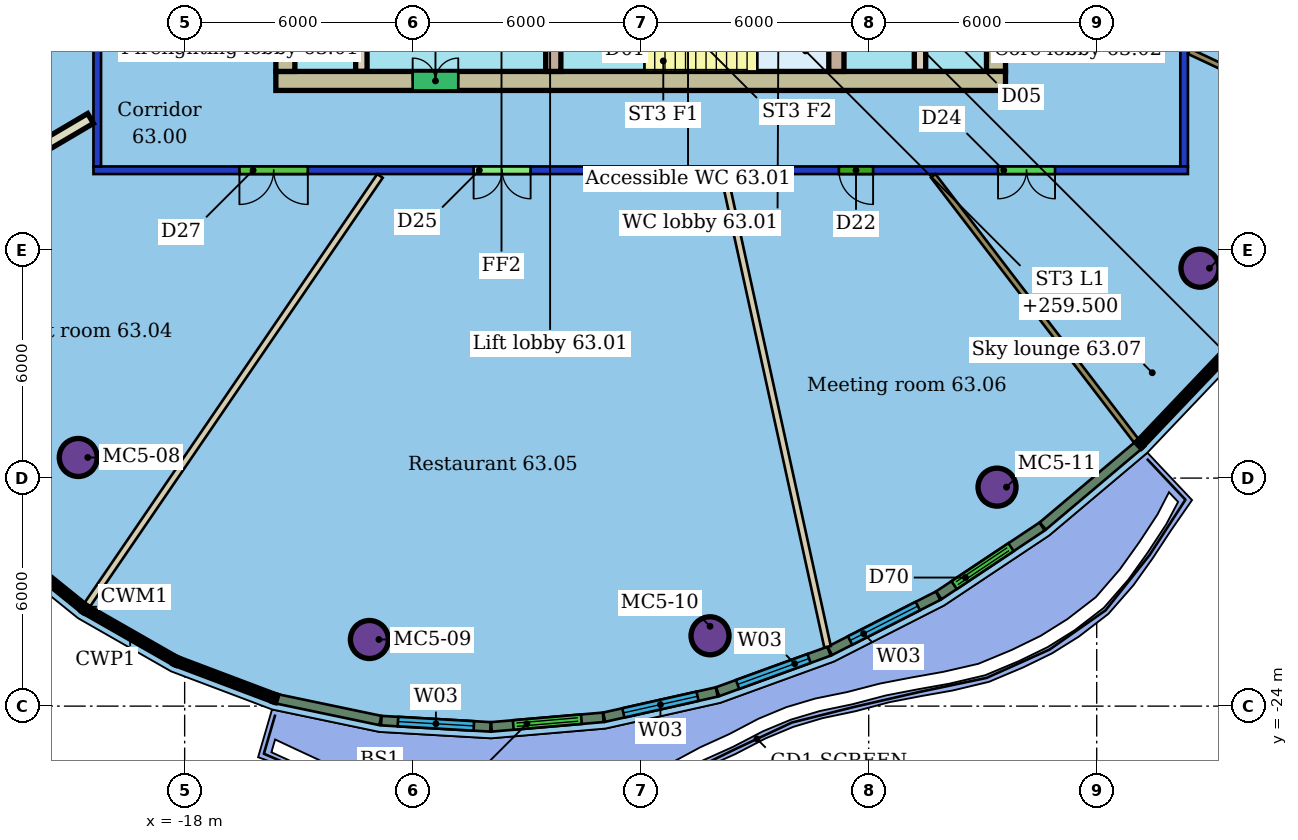
"""IFC4 building model, lengths in metres.
Left out: names, types, materials, properties, quantities, classifications, styles, units other than length and angle.
Written with IfcOpenShell. Run it as: python <this file> out.ifc"""

import sys

from ifc_helpers import new_model, si_unit, direction, frame, frame_2d, origin, origin_2d, place, context, subcontext, project, spatial, rectangle, hollow_circle, extrude, element, fill, save


model = new_model("IFC4")
c1 = context("Model", 3, precision=1e-05, world=origin(), true_north=direction((0.0, 1.0)))
c2 = subcontext(c1, "Body", "Model", "MODEL_VIEW")
j1 = project(units=[si_unit("LENGTHUNIT", "METRE"), si_unit("PLANEANGLEUNIT", "RADIAN")], contexts=[c1])
p1 = place(None, origin())
s1 = spatial("IfcSite", under=j1, at=p1, CompositionType="ELEMENT")
p2 = place(p1, origin())
s2 = spatial("IfcBuilding", under=s1, at=p2, CompositionType="ELEMENT")
p3 = place(p2, frame((0.0, 0.0, 257.7)))
s3 = spatial("IfcBuildingStorey", under=s2, at=p3, CompositionType="ELEMENT", Elevation=257.7)
for number, where, z_axis, x_axis in (
    (1, (-20.8, -17.457, 0.0), (0.0, 0.0, 1.0), (1.0, 0.0, 0.0)),
    (2, (-13.138, -22.247, 0.0), (0.0, 0.0, 1.0), (1.0, 0.0, 0.0)),
    (3, (-4.175, -22.149, 0.0), (0.0, 0.0, 1.0), (1.0, 0.0, 0.0)),
    (4, (3.377, -18.238, 0.0), (0.0, 0.0, 1.0), (1.0, 0.0, 0.0)),
    (5, (8.718, -12.477, 0.0), (0.0, 0.0, 1.0), (1.0, 0.0, 0.0)),
):
    element("IfcColumn", number, at=place(p3, frame(where, z_axis=z_axis, x_axis=x_axis)), inside=s3, PredefinedType="COLUMN", context=c2, shape_type="SweptSolid", body=[
        extrude(hollow_circle(Radius=0.5, WallThickness=0.04, at=origin_2d()), origin(), (0.0, 0.0, 1.0), 3.45),
    ])
p4 = place(p3, frame((8.4, -9.9, 0.0), z_axis=(0.0, 0.0, 1.0), x_axis=(-1.0, 0.0, 0.0)))
e6 = element("IfcWall", 6, at=p4, inside=s3, PredefinedType="PARTITIONING", context=c2, shape_type="SweptSolid", body=[
    extrude(rectangle(XDim=28.8, YDim=0.2, at=frame_2d((14.4, 0.0))), origin(), (0.0, 0.0, 1.0), 3.1),
])
p5 = place(p4, frame((23.159, 0.0, 0.0)))
e7 = element("IfcOpeningElement", 7, at=p5, cuts=e6, PredefinedType="OPENING", context=c2, shape_type="SweptSolid", body=[
    extrude(rectangle(XDim=1.8, YDim=2.4, at=frame_2d((0.9, 1.2))), frame((0.0, 0.11, 0.0), z_axis=(0.0, -1.0, 0.0), x_axis=(1.0, 0.0, 0.0)), (0.0, 0.0, 1.0), 0.22),
])
p6 = place(p4, frame((17.296, 0.0, 0.0)))
e8 = element("IfcOpeningElement", 8, at=p6, cuts=e6, PredefinedType="OPENING", context=c2, shape_type="SweptSolid", body=[
    extrude(rectangle(XDim=1.5, YDim=2.4, at=frame_2d((0.75, 1.2))), frame((0.0, 0.11, 0.0), z_axis=(0.0, -1.0, 0.0), x_axis=(1.0, 0.0, 0.0)), (0.0, 0.0, 1.0), 0.22),
])
p7 = place(p4, frame((8.284, 0.0, 0.0)))
e9 = element("IfcOpeningElement", 9, at=p7, cuts=e6, PredefinedType="OPENING", context=c2, shape_type="SweptSolid", body=[
    extrude(rectangle(XDim=0.9, YDim=2.1, at=frame_2d((0.45, 1.05))), frame((0.0, 0.11, 0.0), z_axis=(0.0, -1.0, 0.0), x_axis=(1.0, 0.0, 0.0)), (0.0, 0.0, 1.0), 0.22),
])
p8 = place(p4, frame((3.497, 0.0, 0.0)))
e10 = element("IfcOpeningElement", 10, at=p8, cuts=e6, PredefinedType="OPENING", context=c2, shape_type="SweptSolid", body=[
    extrude(rectangle(XDim=1.5, YDim=2.1, at=frame_2d((0.75, 1.05))), frame((0.0, 0.11, 0.0), z_axis=(0.0, -1.0, 0.0), x_axis=(1.0, 0.0, 0.0)), (0.0, 0.0, 1.0), 0.22),
])
p9 = place(p3, frame((-20.3, -9.8, 0.0), z_axis=(0.0, 0.0, 1.0), x_axis=(0.0, 1.0, 0.0)))
e11 = element("IfcWall", 11, at=p9, inside=s3, PredefinedType="PARTITIONING", context=c2, shape_type="SweptSolid", body=[
    extrude(rectangle(XDim=19.6, YDim=0.2, at=frame_2d((9.8, 0.0))), origin(), (0.0, 0.0, 1.0), 3.1),
])
p10 = place(p9, frame((13.85, 0.0, 0.0)))
e12 = element("IfcOpeningElement", 12, at=p10, cuts=e11, PredefinedType="OPENING", context=c2, shape_type="SweptSolid", body=[
    extrude(rectangle(XDim=1.5, YDim=2.1, at=frame_2d((0.75, 1.05))), frame((0.0, 0.11, 0.0), z_axis=(0.0, -1.0, 0.0), x_axis=(1.0, 0.0, 0.0)), (0.0, 0.0, 1.0), 0.22),
])
p11 = place(p9, frame((7.092, 0.0, 0.0)))
e13 = element("IfcOpeningElement", 13, at=p11, cuts=e11, PredefinedType="OPENING", context=c2, shape_type="SweptSolid", body=[
    extrude(rectangle(XDim=1.8, YDim=2.4, at=frame_2d((0.9, 1.2))), frame((0.0, 0.11, 0.0), z_axis=(0.0, -1.0, 0.0), x_axis=(1.0, 0.0, 0.0)), (0.0, 0.0, 1.0), 0.22),
])
p12 = place(p3, frame((8.3, 9.8, 0.0), z_axis=(0.0, 0.0, 1.0), x_axis=(0.0, -1.0, 0.0)))
e14 = element("IfcWall", 14, at=p12, inside=s3, PredefinedType="PARTITIONING", context=c2, shape_type="SweptSolid", body=[
    extrude(rectangle(XDim=19.6, YDim=0.2, at=frame_2d((9.8, 0.0))), origin(), (0.0, 0.0, 1.0), 3.1),
])
p13 = place(p12, frame((10.094, 0.0, 0.0)))
e15 = element("IfcOpeningElement", 15, at=p13, cuts=e14, PredefinedType="OPENING", context=c2, shape_type="SweptSolid", body=[
    extrude(rectangle(XDim=1.8, YDim=2.1, at=frame_2d((0.9, 1.05))), frame((0.0, 0.11, 0.0), z_axis=(0.0, -1.0, 0.0), x_axis=(1.0, 0.0, 0.0)), (0.0, 0.0, 1.0), 0.22),
])
p14 = place(p3, frame((-27.309, -12.566, 0.0), z_axis=(0.0, 0.0, 1.0), x_axis=(0.861365558052, 0.507985605506, 0.0)))
e16 = element("IfcWall", 16, at=p14, inside=s3, PredefinedType="PARTITIONING", context=c2, shape_type="SweptSolid", body=[
    extrude(rectangle(XDim=7.932, YDim=0.3, at=frame_2d((3.966, 0.0))), origin(), (0.0, 0.0, 1.0), 3.45),
])
p15 = place(p3, frame((-20.565, -21.335, 0.0), z_axis=(0.0, 0.0, 1.0), x_axis=(0.563811273549, 0.825903655289, 0.0)))
e17 = element("IfcWall", 17, at=p15, inside=s3, PredefinedType="PARTITIONING", context=c2, shape_type="SweptSolid", body=[
    extrude(rectangle(XDim=13.665, YDim=0.175, at=frame_2d((6.833, 0.0))), origin(), (0.0, 0.0, 1.0), 3.45),
])
p16 = place(p3, frame((-1.083, -22.437, 0.0), z_axis=(0.0, 0.0, 1.0), x_axis=(-0.214054252259, 0.976821773452, 0.0)))
e18 = element("IfcWall", 18, at=p16, inside=s3, PredefinedType="PARTITIONING", context=c2, shape_type="SweptSolid", body=[
    extrude(rectangle(XDim=12.713, YDim=0.175, at=frame_2d((6.356, 0.0))), origin(), (0.0, 0.0, 1.0), 3.45),
])
p17 = place(p3, frame((7.042, -17.022, 0.0), z_axis=(0.0, 0.0, 1.0), x_axis=(-0.60820873777, 0.793777129489, 0.0)))
e19 = element("IfcWall", 19, at=p17, inside=s3, PredefinedType="PARTITIONING", context=c2, shape_type="SweptSolid", body=[
    extrude(rectangle(XDim=8.789, YDim=0.15, at=frame_2d((4.394, 0.0))), origin(), (0.0, 0.0, 1.0), 3.45),
])
p18 = place(p3, frame((13.177, -8.997, 0.0), z_axis=(0.0, 0.0, 1.0), x_axis=(-0.90531006568, 0.424751321337, 0.0)))
e20 = element("IfcWall", 20, at=p18, inside=s3, PredefinedType="PARTITIONING", context=c2, shape_type="SweptSolid", body=[
    extrude(rectangle(XDim=5.241, YDim=0.15, at=frame_2d((2.621, 0.0))), origin(), (0.0, 0.0, 1.0), 3.45),
])
p19 = place(p3, frame((-15.563, -23.811, 0.0), z_axis=(0.0, 0.0, 1.0), x_axis=(0.978796787282, -0.20483371111, 0.0)))
e21 = element("IfcWall", 21, at=p19, inside=s3, PredefinedType="SOLIDWALL", context=c2, shape_type="SweptSolid", body=[
    extrude(rectangle(XDim=2.771, YDim=0.25, at=frame_2d((1.386, 0.0))), origin(), (0.0, 0.0, 1.0), 3.15),
])
p20 = place(p3, frame((-12.824, -24.382, 0.0), z_axis=(0.0, 0.0, 1.0), x_axis=(0.998361927318, -0.057214177282, 0.0)))
e22 = element("IfcWall", 22, at=p20, inside=s3, PredefinedType="SOLIDWALL", context=c2, shape_type="SweptSolid", body=[
    extrude(rectangle(XDim=2.876, YDim=0.25, at=frame_2d((1.438, 0.0))), origin(), (0.0, 0.0, 1.0), 3.15),
])
p21 = place(p20, frame((0.438, 0.0, 0.9)))
e23 = element("IfcOpeningElement", 23, at=p21, cuts=e22, PredefinedType="OPENING", context=c2, shape_type="SweptSolid", body=[
    extrude(rectangle(XDim=2.0, YDim=2.1, at=frame_2d((1.0, 1.05))), frame((0.0, 0.135, 0.0), z_axis=(0.0, -1.0, 0.0), x_axis=(1.0, 0.0, 0.0)), (0.0, 0.0, 1.0), 0.27),
])
p22 = place(p3, frame((-9.927, -24.546, 0.0), z_axis=(0.0, 0.0, 1.0), x_axis=(0.996387742916, 0.084920349541, 0.0)))
e24 = element("IfcWall", 24, at=p22, inside=s3, PredefinedType="SOLIDWALL", context=c2, shape_type="SweptSolid", body=[
    extrude(rectangle(XDim=2.953, YDim=0.25, at=frame_2d((1.476, 0.0))), origin(), (0.0, 0.0, 1.0), 3.15),
])
p23 = place(p22, frame((0.576, 0.0, 0.0)))
e25 = element("IfcOpeningElement", 25, at=p23, cuts=e24, PredefinedType="OPENING", context=c2, shape_type="SweptSolid", body=[
    extrude(rectangle(XDim=1.8, YDim=2.4, at=frame_2d((0.9, 1.2))), frame((0.0, 0.135, 0.0), z_axis=(0.0, -1.0, 0.0), x_axis=(1.0, 0.0, 0.0)), (0.0, 0.0, 1.0), 0.27),
])
p24 = place(p3, frame((-6.961, -24.291, 0.0), z_axis=(0.0, 0.0, 1.0), x_axis=(0.975828037389, 0.218539793734, 0.0)))
e26 = element("IfcWall", 26, at=p24, inside=s3, PredefinedType="SOLIDWALL", context=c2, shape_type="SweptSolid", body=[
    extrude(rectangle(XDim=3.035, YDim=0.25, at=frame_2d((1.518, 0.0))), origin(), (0.0, 0.0, 1.0), 3.15),
])
p25 = place(p24, frame((0.518, 0.0, 0.9)))
e27 = element("IfcOpeningElement", 27, at=p25, cuts=e26, PredefinedType="OPENING", context=c2, shape_type="SweptSolid", body=[
    extrude(rectangle(XDim=2.0, YDim=2.1, at=frame_2d((1.0, 1.05))), frame((0.0, 0.135, 0.0), z_axis=(0.0, -1.0, 0.0), x_axis=(1.0, 0.0, 0.0)), (0.0, 0.0, 1.0), 0.27),
])
p26 = place(p3, frame((-3.976, -23.621, 0.0), z_axis=(0.0, 0.0, 1.0), x_axis=(0.93980485135, 0.341711634831, 0.0)))
e28 = element("IfcWall", 28, at=p26, inside=s3, PredefinedType="SOLIDWALL", context=c2, shape_type="SweptSolid", body=[
    extrude(rectangle(XDim=3.119, YDim=0.25, at=frame_2d((1.559, 0.0))), origin(), (0.0, 0.0, 1.0), 3.15),
])
p27 = place(p26, frame((0.559, 0.0, 0.9)))
e29 = element("IfcOpeningElement", 29, at=p27, cuts=e28, PredefinedType="OPENING", context=c2, shape_type="SweptSolid", body=[
    extrude(rectangle(XDim=2.0, YDim=2.1, at=frame_2d((1.0, 1.05))), frame((0.0, 0.135, 0.0), z_axis=(0.0, -1.0, 0.0), x_axis=(1.0, 0.0, 0.0)), (0.0, 0.0, 1.0), 0.27),
])
p28 = place(p3, frame((-1.023, -22.546, 0.0), z_axis=(0.0, 0.0, 1.0), x_axis=(0.891165922341, 0.453677527389, 0.0)))
e30 = element("IfcWall", 30, at=p28, inside=s3, PredefinedType="SOLIDWALL", context=c2, shape_type="SweptSolid", body=[
    extrude(rectangle(XDim=3.197, YDim=0.25, at=frame_2d((1.599, 0.0))), origin(), (0.0, 0.0, 1.0), 3.15),
])
p29 = place(p28, frame((0.599, 0.0, 0.9)))
e31 = element("IfcOpeningElement", 31, at=p29, cuts=e30, PredefinedType="OPENING", context=c2, shape_type="SweptSolid", body=[
    extrude(rectangle(XDim=2.0, YDim=2.1, at=frame_2d((1.0, 1.05))), frame((0.0, 0.135, 0.0), z_axis=(0.0, -1.0, 0.0), x_axis=(1.0, 0.0, 0.0)), (0.0, 0.0, 1.0), 0.27),
])
p30 = place(p3, frame((1.845, -21.084, 0.0), z_axis=(0.0, 0.0, 1.0), x_axis=(0.832199778985, 0.554475903767, 0.0)))
e32 = element("IfcWall", 32, at=p30, inside=s3, PredefinedType="SOLIDWALL", context=c2, shape_type="SweptSolid", body=[
    extrude(rectangle(XDim=3.266, YDim=0.25, at=frame_2d((1.633, 0.0))), origin(), (0.0, 0.0, 1.0), 3.15),
])
p31 = place(p30, frame((0.483, 0.0, 0.0)))
e33 = element("IfcOpeningElement", 33, at=p31, cuts=e32, PredefinedType="OPENING", context=c2, shape_type="SweptSolid", body=[
    extrude(rectangle(XDim=1.8, YDim=2.4, at=frame_2d((0.9, 1.2))), frame((0.0, 0.135, 0.0), z_axis=(0.0, -1.0, 0.0), x_axis=(1.0, 0.0, 0.0)), (0.0, 0.0, 1.0), 0.27),
])
p32 = place(p3, frame((4.581, -19.26, 0.0), z_axis=(0.0, 0.0, 1.0), x_axis=(0.764538162014, 0.644578465995, 0.0)))
e34 = element("IfcWall", 34, at=p32, inside=s3, PredefinedType="SOLIDWALL", context=c2, shape_type="SweptSolid", body=[
    extrude(rectangle(XDim=3.277, YDim=0.25, at=frame_2d((1.638, 0.0))), origin(), (0.0, 0.0, 1.0), 3.15),
])
p33 = place(p3, frame((-15.6, -7.55, 0.0), z_axis=(0.0, 0.0, 1.0), x_axis=(1.0, 0.0, 0.0)))
e35 = element("IfcWall", 35, at=p33, inside=s3, PredefinedType="SHEAR", context=c2, shape_type="SweptSolid", body=[
    extrude(rectangle(XDim=19.2, YDim=0.5, at=frame_2d((9.6, 0.0))), origin(), (0.0, 0.0, 1.0), 3.3),
])
p34 = place(p33, frame((3.6, 0.0, 0.0)))
e36 = element("IfcOpeningElement", 36, at=p34, cuts=e35, PredefinedType="OPENING", context=c2, shape_type="SweptSolid", body=[
    extrude(rectangle(XDim=1.2, YDim=2.1, at=frame_2d((0.6, 1.05))), frame((0.0, 0.26, 0.0), z_axis=(0.0, -1.0, 0.0), x_axis=(1.0, 0.0, 0.0)), (0.0, 0.0, 1.0), 0.52),
])
p35 = place(p3, frame((-15.35, 7.3, 0.0), z_axis=(0.0, 0.0, 1.0), x_axis=(0.0, -1.0, 0.0)))
e37 = element("IfcWall", 37, at=p35, inside=s3, PredefinedType="SHEAR", context=c2, shape_type="SweptSolid", body=[
    extrude(rectangle(XDim=14.6, YDim=0.5, at=frame_2d((7.3, 0.0))), origin(), (0.0, 0.0, 1.0), 3.3),
])
p36 = place(p35, frame((10.6, 0.0, 0.0)))
e38 = element("IfcOpeningElement", 38, at=p36, cuts=e37, PredefinedType="OPENING", context=c2, shape_type="SweptSolid", body=[
    extrude(rectangle(XDim=1.2, YDim=2.1, at=frame_2d((0.6, 1.05))), frame((0.0, 0.26, 0.0), z_axis=(0.0, -1.0, 0.0), x_axis=(1.0, 0.0, 0.0)), (0.0, 0.0, 1.0), 0.52),
])
p37 = place(p35, frame((2.8, 0.0, 0.0)))
e39 = element("IfcOpeningElement", 39, at=p37, cuts=e37, PredefinedType="OPENING", context=c2, shape_type="SweptSolid", body=[
    extrude(rectangle(XDim=1.2, YDim=2.1, at=frame_2d((0.6, 1.05))), frame((0.0, 0.26, 0.0), z_axis=(0.0, -1.0, 0.0), x_axis=(1.0, 0.0, 0.0)), (0.0, 0.0, 1.0), 0.52),
])
p38 = place(p3, frame((3.35, -7.3, 0.0), z_axis=(0.0, 0.0, 1.0), x_axis=(0.0, 1.0, 0.0)))
e40 = element("IfcWall", 40, at=p38, inside=s3, PredefinedType="SHEAR", context=c2, shape_type="SweptSolid", body=[
    extrude(rectangle(XDim=14.6, YDim=0.5, at=frame_2d((7.3, 0.0))), origin(), (0.0, 0.0, 1.0), 3.3),
])
p39 = place(p38, frame((2.8, 0.0, 0.0)))
e41 = element("IfcOpeningElement", 41, at=p39, cuts=e40, PredefinedType="OPENING", context=c2, shape_type="SweptSolid", body=[
    extrude(rectangle(XDim=1.2, YDim=2.1, at=frame_2d((0.6, 1.05))), frame((0.0, 0.26, 0.0), z_axis=(0.0, -1.0, 0.0), x_axis=(1.0, 0.0, 0.0)), (0.0, 0.0, 1.0), 0.52),
])
p40 = place(p38, frame((10.6, 0.0, 0.0)))
e42 = element("IfcOpeningElement", 42, at=p40, cuts=e40, PredefinedType="OPENING", context=c2, shape_type="SweptSolid", body=[
    extrude(rectangle(XDim=1.2, YDim=2.1, at=frame_2d((0.6, 1.05))), frame((0.0, 0.26, 0.0), z_axis=(0.0, -1.0, 0.0), x_axis=(1.0, 0.0, 0.0)), (0.0, 0.0, 1.0), 0.52),
])
p41 = place(p3, frame((-13.35, 7.3, 0.0), z_axis=(0.0, 0.0, 1.0), x_axis=(0.0, -1.0, 0.0)))
e43 = element("IfcWall", 43, at=p41, inside=s3, PredefinedType="SHEAR", context=c2, shape_type="SweptSolid", body=[
    extrude(rectangle(XDim=14.6, YDim=0.3, at=frame_2d((7.3, 0.0))), origin(), (0.0, 0.0, 1.0), 3.3),
])
p42 = place(p41, frame((6.55, 0.0, 0.0)))
e44 = element("IfcOpeningElement", 44, at=p42, cuts=e43, PredefinedType="OPENING", context=c2, shape_type="SweptSolid", body=[
    extrude(rectangle(XDim=1.5, YDim=2.1, at=frame_2d((0.75, 1.05))), frame((0.0, 0.16, 0.0), z_axis=(0.0, -1.0, 0.0), x_axis=(1.0, 0.0, 0.0)), (0.0, 0.0, 1.0), 0.32),
])
p43 = place(p3, frame((1.35, -7.3, 0.0), z_axis=(0.0, 0.0, 1.0), x_axis=(0.0, 1.0, 0.0)))
e45 = element("IfcWall", 45, at=p43, inside=s3, PredefinedType="SHEAR", context=c2, shape_type="SweptSolid", body=[
    extrude(rectangle(XDim=14.6, YDim=0.3, at=frame_2d((7.3, 0.0))), origin(), (0.0, 0.0, 1.0), 3.3),
])
p44 = place(p43, frame((1.21, 0.0, 0.0)))
e46 = element("IfcOpeningElement", 46, at=p44, cuts=e45, PredefinedType="OPENING", context=c2, shape_type="SweptSolid", body=[
    extrude(rectangle(XDim=1.0, YDim=2.1, at=frame_2d((0.5, 1.05))), frame((0.0, 0.16, 0.0), z_axis=(0.0, -1.0, 0.0), x_axis=(1.0, 0.0, 0.0)), (0.0, 0.0, 1.0), 0.32),
])
p45 = place(p43, frame((6.55, 0.0, 0.0)))
e47 = element("IfcOpeningElement", 47, at=p45, cuts=e45, PredefinedType="OPENING", context=c2, shape_type="SweptSolid", body=[
    extrude(rectangle(XDim=1.5, YDim=2.1, at=frame_2d((0.75, 1.05))), frame((0.0, 0.16, 0.0), z_axis=(0.0, -1.0, 0.0), x_axis=(1.0, 0.0, 0.0)), (0.0, 0.0, 1.0), 0.32),
])
p46 = place(p3, frame((-8.3, -3.88, 0.0), z_axis=(0.0, 0.0, 1.0), x_axis=(0.0, -1.0, 0.0)))
e48 = element("IfcWall", 48, at=p46, inside=s3, PredefinedType="SHEAR", context=c2, shape_type="SweptSolid", body=[
    extrude(rectangle(XDim=3.42, YDim=0.4, at=frame_2d((1.71, 0.0))), origin(), (0.0, 0.0, 1.0), 3.3),
])
p47 = place(p46, frame((1.11, 0.0, 0.0)))
e49 = element("IfcOpeningElement", 49, at=p47, cuts=e48, PredefinedType="OPENING", context=c2, shape_type="SweptSolid", body=[
    extrude(rectangle(XDim=1.2, YDim=2.1, at=frame_2d((0.6, 1.05))), frame((0.0, 0.21, 0.0), z_axis=(0.0, -1.0, 0.0), x_axis=(1.0, 0.0, 0.0)), (0.0, 0.0, 1.0), 0.42),
])
p48 = place(p3, frame((-0.85, -3.88, 0.0), z_axis=(0.0, 0.0, 1.0), x_axis=(0.0, -1.0, 0.0)))
e50 = element("IfcWall", 50, at=p48, inside=s3, PredefinedType="SHEAR", context=c2, shape_type="SweptSolid", body=[
    extrude(rectangle(XDim=3.42, YDim=0.4, at=frame_2d((1.71, 0.0))), origin(), (0.0, 0.0, 1.0), 3.3),
])
p49 = place(p5, origin())
e51 = element("IfcDoor", 51, at=p49, inside=s3, OperationType="DOUBLE_DOOR_SINGLE_SWING", PredefinedType="DOOR", context=c2, shape_type="SweptSolid", body=[
    extrude(rectangle(XDim=1.8, YDim=2.4, at=frame_2d((0.9, 1.2))), frame((0.0, 0.025, 0.0), z_axis=(0.0, -1.0, 0.0), x_axis=(1.0, 0.0, 0.0)), (0.0, 0.0, 1.0), 0.05),
])
fill(e7, e51)
p50 = place(p6, origin())
e52 = element("IfcDoor", 52, at=p50, inside=s3, OperationType="DOUBLE_DOOR_SINGLE_SWING", PredefinedType="DOOR", context=c2, shape_type="SweptSolid", body=[
    extrude(rectangle(XDim=1.5, YDim=2.4, at=frame_2d((0.75, 1.2))), frame((0.0, 0.025, 0.0), z_axis=(0.0, -1.0, 0.0), x_axis=(1.0, 0.0, 0.0)), (0.0, 0.0, 1.0), 0.05),
])
fill(e8, e52)
p51 = place(p7, origin())
e53 = element("IfcDoor", 53, at=p51, inside=s3, OperationType="SINGLE_SWING_LEFT", PredefinedType="DOOR", context=c2, shape_type="SweptSolid", body=[
    extrude(rectangle(XDim=0.9, YDim=2.1, at=frame_2d((0.45, 1.05))), frame((0.0, 0.025, 0.0), z_axis=(0.0, -1.0, 0.0), x_axis=(1.0, 0.0, 0.0)), (0.0, 0.0, 1.0), 0.05),
])
fill(e9, e53)
p52 = place(p8, origin())
e54 = element("IfcDoor", 54, at=p52, inside=s3, OperationType="DOUBLE_DOOR_SINGLE_SWING", PredefinedType="DOOR", context=c2, shape_type="SweptSolid", body=[
    extrude(rectangle(XDim=1.5, YDim=2.1, at=frame_2d((0.75, 1.05))), frame((0.0, 0.025, 0.0), z_axis=(0.0, -1.0, 0.0), x_axis=(1.0, 0.0, 0.0)), (0.0, 0.0, 1.0), 0.05),
])
fill(e10, e54)
p53 = place(p21, origin())
e55 = element("IfcWindow", 55, at=p53, inside=s3, PartitioningType="SINGLE_PANEL", PredefinedType="WINDOW", context=c2, shape_type="SweptSolid", body=[
    extrude(rectangle(XDim=2.0, YDim=2.1, at=frame_2d((1.0, 1.05))), frame((0.0, 0.03, 0.0), z_axis=(0.0, -1.0, 0.0), x_axis=(1.0, 0.0, 0.0)), (0.0, 0.0, 1.0), 0.06),
])
fill(e23, e55)
p54 = place(p23, origin())
e56 = element("IfcDoor", 56, at=p54, inside=s3, OperationType="DOUBLE_DOOR_SLIDING", PredefinedType="DOOR", context=c2, shape_type="SweptSolid", body=[
    extrude(rectangle(XDim=1.8, YDim=2.4, at=frame_2d((0.9, 1.2))), frame((0.0, 0.025, 0.0), z_axis=(0.0, -1.0, 0.0), x_axis=(1.0, 0.0, 0.0)), (0.0, 0.0, 1.0), 0.05),
])
fill(e25, e56)
p55 = place(p25, origin())
e57 = element("IfcWindow", 57, at=p55, inside=s3, PartitioningType="SINGLE_PANEL", PredefinedType="WINDOW", context=c2, shape_type="SweptSolid", body=[
    extrude(rectangle(XDim=2.0, YDim=2.1, at=frame_2d((1.0, 1.05))), frame((0.0, 0.03, 0.0), z_axis=(0.0, -1.0, 0.0), x_axis=(1.0, 0.0, 0.0)), (0.0, 0.0, 1.0), 0.06),
])
fill(e27, e57)
p56 = place(p27, origin())
e58 = element("IfcWindow", 58, at=p56, inside=s3, PartitioningType="SINGLE_PANEL", PredefinedType="WINDOW", context=c2, shape_type="SweptSolid", body=[
    extrude(rectangle(XDim=2.0, YDim=2.1, at=frame_2d((1.0, 1.05))), frame((0.0, 0.03, 0.0), z_axis=(0.0, -1.0, 0.0), x_axis=(1.0, 0.0, 0.0)), (0.0, 0.0, 1.0), 0.06),
])
fill(e29, e58)
p57 = place(p29, origin())
e59 = element("IfcWindow", 59, at=p57, inside=s3, PartitioningType="SINGLE_PANEL", PredefinedType="WINDOW", context=c2, shape_type="SweptSolid", body=[
    extrude(rectangle(XDim=2.0, YDim=2.1, at=frame_2d((1.0, 1.05))), frame((0.0, 0.03, 0.0), z_axis=(0.0, -1.0, 0.0), x_axis=(1.0, 0.0, 0.0)), (0.0, 0.0, 1.0), 0.06),
])
fill(e31, e59)
p58 = place(p31, origin())
e60 = element("IfcDoor", 60, at=p58, inside=s3, OperationType="DOUBLE_DOOR_SLIDING", PredefinedType="DOOR", context=c2, shape_type="SweptSolid", body=[
    extrude(rectangle(XDim=1.8, YDim=2.4, at=frame_2d((0.9, 1.2))), frame((0.0, 0.025, 0.0), z_axis=(0.0, -1.0, 0.0), x_axis=(1.0, 0.0, 0.0)), (0.0, 0.0, 1.0), 0.05),
])
fill(e33, e60)
p59 = place(p34, origin())
e61 = element("IfcDoor", 61, at=p59, inside=s3, OperationType="DOUBLE_DOOR_SINGLE_SWING", PredefinedType="NOTDEFINED", context=c2, shape_type="SweptSolid", body=[
    extrude(rectangle(XDim=1.2, YDim=2.1, at=frame_2d((0.6, 1.05))), frame((0.0, 0.025, 0.0), z_axis=(0.0, -1.0, 0.0), x_axis=(1.0, 0.0, 0.0)), (0.0, 0.0, 1.0), 0.05),
])
fill(e36, e61)
save(model, sys.argv[1])
